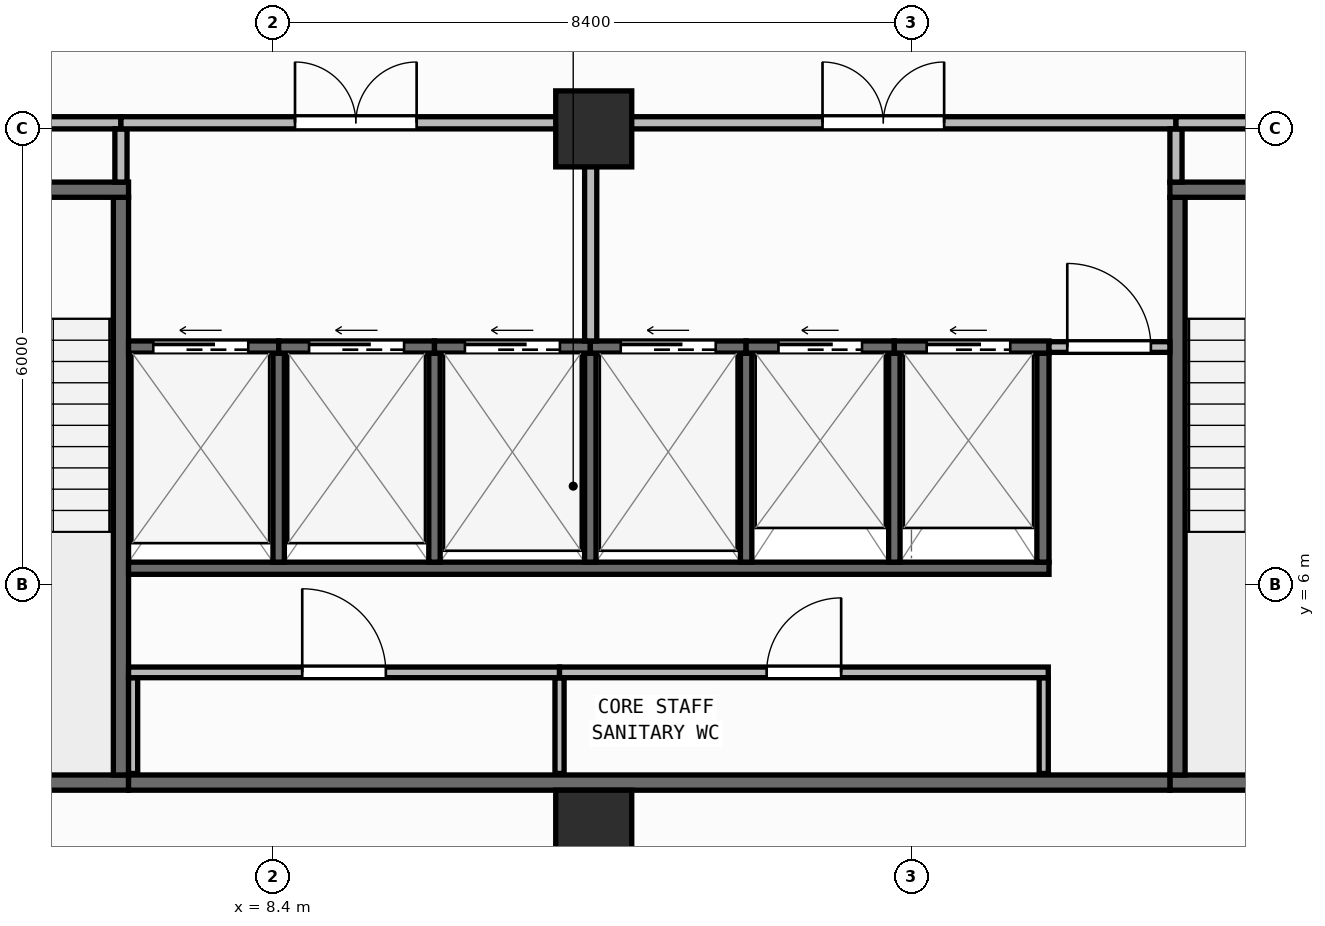
"""IFC4 building model, lengths in metres.
Left out: names, types, materials, properties, quantities, classifications, styles, units other than length and angle.
Written with IfcOpenShell. Run it as: python <this file> out.ifc"""

import sys

from ifc_helpers import new_model, si_unit, direction, frame, frame_2d, origin, origin_2d, place, context, subcontext, project, spatial, rectangle, extrude, element, fill, save


model = new_model("IFC4")
c1 = context("Model", 3, precision=1e-05, world=origin(), true_north=direction((0.0, 1.0)))
c2 = subcontext(c1, "Body", "Model", "MODEL_VIEW")
j1 = project(units=[si_unit("LENGTHUNIT", "METRE"), si_unit("PLANEANGLEUNIT", "RADIAN")], contexts=[c1])
p1 = place(None, origin())
s1 = spatial("IfcSite", under=j1, at=p1, CompositionType="ELEMENT")
p2 = place(p1, origin())
s2 = spatial("IfcBuilding", under=s1, at=p2, CompositionType="ELEMENT")
p3 = place(p2, frame((0.0, 0.0, 211.85)))
s3 = spatial("IfcBuildingStorey", under=s2, at=p3, CompositionType="ELEMENT", Elevation=211.85)
for number, where, z_axis, x_axis in (
    (1, (12.62, 2.8, 0.0), (0.0, 0.0, 1.0), (1.0, 0.0, 0.0)),
    (2, (12.62, 12.0, 0.0), (0.0, 0.0, 1.0), (1.0, 0.0, 0.0)),
):
    element("IfcColumn", number, at=place(p3, frame(where, z_axis=z_axis, x_axis=x_axis)), inside=s3, PredefinedType="COLUMN", context=c2, shape_type="SweptSolid", body=[
        extrude(rectangle(XDim=1.0, YDim=1.0, at=origin_2d()), origin(), (0.0, 0.0, 1.0), 3.95),
    ])
p4 = place(p3, frame((2.66, 0.174, 0.0), z_axis=(0.0, 0.0, 1.0), x_axis=(0.996634028439, 0.081979347142, 0.0)))
e3 = element("IfcWall", 3, at=p4, inside=s3, PredefinedType="STANDARD", context=c2, shape_type="SweptSolid", body=[
    extrude(rectangle(XDim=46.035, YDim=0.26, at=frame_2d((23.018, 0.0))), origin(), (0.0, 0.0, 1.0), 3.71),
])
p5 = place(p4, frame((21.817, 0.0, 0.9)))
e4 = element("IfcOpeningElement", 4, at=p5, cuts=e3, PredefinedType="OPENING", context=c2, shape_type="SweptSolid", body=[
    extrude(rectangle(XDim=2.4, YDim=1.65, at=frame_2d((1.2, 0.825))), frame((0.0, 0.14, 0.0), z_axis=(0.0, -1.0, 0.0), x_axis=(1.0, 0.0, 0.0)), (0.0, 0.0, 1.0), 0.28),
])
p6 = place(p3, frame((2.8, 3.4, 0.0), z_axis=(0.0, 0.0, 1.0), x_axis=(1.0, 0.0, 0.0)))
e5 = element("IfcWall", 5, at=p6, inside=s3, PredefinedType="SHEAR", context=c2, shape_type="SweptSolid", body=[
    extrude(rectangle(XDim=3.7, YDim=0.2, at=frame_2d((1.85, 0.0))), origin(), (0.0, 0.0, 1.0), 3.71),
])
p7 = place(p3, frame((6.4, 3.5, 0.0), z_axis=(0.0, 0.0, 1.0), x_axis=(0.0, 1.0, 0.0)))
e6 = element("IfcWall", 6, at=p7, inside=s3, PredefinedType="SHEAR", context=c2, shape_type="SweptSolid", body=[
    extrude(rectangle(XDim=7.6, YDim=0.2, at=frame_2d((3.8, 0.0))), origin(), (0.0, 0.0, 1.0), 3.71),
])
p8 = place(p3, frame((2.8, 11.2, 0.0), z_axis=(0.0, 0.0, 1.0), x_axis=(1.0, 0.0, 0.0)))
e7 = element("IfcWall", 7, at=p8, inside=s3, PredefinedType="SHEAR", context=c2, shape_type="SweptSolid", body=[
    extrude(rectangle(XDim=3.7, YDim=0.2, at=frame_2d((1.85, 0.0))), origin(), (0.0, 0.0, 1.0), 3.71),
])
p9 = place(p8, frame((1.2, 0.0, 0.0)))
e8 = element("IfcOpeningElement", 8, at=p9, cuts=e7, PredefinedType="OPENING", context=c2, shape_type="SweptSolid", body=[
    extrude(rectangle(XDim=1.3, YDim=2.15, at=frame_2d((0.65, 1.075))), frame((0.0, 0.11, 0.0), z_axis=(0.0, -1.0, 0.0), x_axis=(1.0, 0.0, 0.0)), (0.0, 0.0, 1.0), 0.22),
])
p10 = place(p3, frame((20.2, 3.4, 0.0), z_axis=(0.0, 0.0, 1.0), x_axis=(1.0, 0.0, 0.0)))
e9 = element("IfcWall", 9, at=p10, inside=s3, PredefinedType="SHEAR", context=c2, shape_type="SweptSolid", body=[
    extrude(rectangle(XDim=3.7, YDim=0.2, at=frame_2d((1.85, 0.0))), origin(), (0.0, 0.0, 1.0), 3.71),
])
p11 = place(p3, frame((20.3, 3.5, 0.0), z_axis=(0.0, 0.0, 1.0), x_axis=(0.0, 1.0, 0.0)))
e10 = element("IfcWall", 10, at=p11, inside=s3, PredefinedType="SHEAR", context=c2, shape_type="SweptSolid", body=[
    extrude(rectangle(XDim=7.6, YDim=0.2, at=frame_2d((3.8, 0.0))), origin(), (0.0, 0.0, 1.0), 3.71),
])
p12 = place(p3, frame((20.2, 11.2, 0.0), z_axis=(0.0, 0.0, 1.0), x_axis=(1.0, 0.0, 0.0)))
e11 = element("IfcWall", 11, at=p12, inside=s3, PredefinedType="SHEAR", context=c2, shape_type="SweptSolid", body=[
    extrude(rectangle(XDim=3.7, YDim=0.2, at=frame_2d((1.85, 0.0))), origin(), (0.0, 0.0, 1.0), 3.71),
])
p13 = place(p12, frame((1.2, 0.0, 0.0)))
e12 = element("IfcOpeningElement", 12, at=p13, cuts=e11, PredefinedType="OPENING", context=c2, shape_type="SweptSolid", body=[
    extrude(rectangle(XDim=1.3, YDim=2.15, at=frame_2d((0.65, 1.075))), frame((0.0, 0.11, 0.0), z_axis=(0.0, -1.0, 0.0), x_axis=(1.0, 0.0, 0.0)), (0.0, 0.0, 1.0), 0.22),
])
p14 = place(p3, frame((6.5, 3.4, 0.0), z_axis=(0.0, 0.0, 1.0), x_axis=(1.0, 0.0, 0.0)))
e13 = element("IfcWall", 13, at=p14, inside=s3, PredefinedType="SHEAR", context=c2, shape_type="SweptSolid", body=[
    extrude(rectangle(XDim=13.7, YDim=0.2, at=frame_2d((6.85, 0.0))), origin(), (0.0, 0.0, 1.0), 3.71),
])
p15 = place(p3, frame((6.5, 6.22, 0.0), z_axis=(0.0, 0.0, 1.0), x_axis=(1.0, 0.0, 0.0)))
e14 = element("IfcWall", 14, at=p15, inside=s3, PredefinedType="SHEAR", context=c2, shape_type="SweptSolid", body=[
    extrude(rectangle(XDim=12.11, YDim=0.16, at=frame_2d((6.055, 0.0))), origin(), (0.0, 0.0, 1.0), 3.71),
])
p16 = place(p3, frame((18.53, 6.3, 0.0), z_axis=(0.0, 0.0, 1.0), x_axis=(0.0, 1.0, 0.0)))
e15 = element("IfcWall", 15, at=p16, inside=s3, PredefinedType="SHEAR", context=c2, shape_type="SweptSolid", body=[
    extrude(rectangle(XDim=2.75, YDim=0.16, at=frame_2d((1.375, 0.0))), origin(), (0.0, 0.0, 1.0), 3.71),
])
for number, where, z_axis, x_axis in (
    (16, (8.475, 6.3, 0.0), (0.0, 0.0, 1.0), (0.0, 1.0, 0.0)),
    (17, (10.525, 6.3, 0.0), (0.0, 0.0, 1.0), (0.0, 1.0, 0.0)),
    (18, (12.575, 6.3, 0.0), (0.0, 0.0, 1.0), (0.0, 1.0, 0.0)),
    (19, (14.625, 6.3, 0.0), (0.0, 0.0, 1.0), (0.0, 1.0, 0.0)),
    (20, (16.575, 6.3, 0.0), (0.0, 0.0, 1.0), (0.0, 1.0, 0.0)),
):
    element("IfcWall", number, at=place(p3, frame(where, z_axis=z_axis, x_axis=x_axis)), inside=s3, PredefinedType="SHEAR", context=c2, shape_type="SweptSolid", body=[
        extrude(rectangle(XDim=2.75, YDim=0.15, at=frame_2d((1.375, 0.0))), origin(), (0.0, 0.0, 1.0), 3.71),
    ])
p17 = place(p3, frame((6.5, 9.13, 0.0), z_axis=(0.0, 0.0, 1.0), x_axis=(1.0, 0.0, 0.0)))
e21 = element("IfcWall", 21, at=p17, inside=s3, PredefinedType="SHEAR", context=c2, shape_type="SweptSolid", body=[
    extrude(rectangle(XDim=1.975, YDim=0.16, at=frame_2d((0.988, 0.0))), origin(), (0.0, 0.0, 1.0), 3.71),
])
p18 = place(p17, frame((0.325, 0.0, 0.0)))
e22 = element("IfcOpeningElement", 22, at=p18, cuts=e21, PredefinedType="OPENING", context=c2, shape_type="SweptSolid", body=[
    extrude(rectangle(XDim=1.25, YDim=2.15, at=frame_2d((0.625, 1.075))), frame((0.0, 0.09, 0.0), z_axis=(0.0, -1.0, 0.0), x_axis=(1.0, 0.0, 0.0)), (0.0, 0.0, 1.0), 0.18),
])
p19 = place(p3, frame((8.475, 9.13, 0.0), z_axis=(0.0, 0.0, 1.0), x_axis=(1.0, 0.0, 0.0)))
e23 = element("IfcWall", 23, at=p19, inside=s3, PredefinedType="SHEAR", context=c2, shape_type="SweptSolid", body=[
    extrude(rectangle(XDim=2.05, YDim=0.16, at=frame_2d((1.025, 0.0))), origin(), (0.0, 0.0, 1.0), 3.71),
])
p20 = place(p19, frame((0.4, 0.0, 0.0)))
e24 = element("IfcOpeningElement", 24, at=p20, cuts=e23, PredefinedType="OPENING", context=c2, shape_type="SweptSolid", body=[
    extrude(rectangle(XDim=1.25, YDim=2.15, at=frame_2d((0.625, 1.075))), frame((0.0, 0.09, 0.0), z_axis=(0.0, -1.0, 0.0), x_axis=(1.0, 0.0, 0.0)), (0.0, 0.0, 1.0), 0.18),
])
p21 = place(p3, frame((10.525, 9.13, 0.0), z_axis=(0.0, 0.0, 1.0), x_axis=(1.0, 0.0, 0.0)))
e25 = element("IfcWall", 25, at=p21, inside=s3, PredefinedType="SHEAR", context=c2, shape_type="SweptSolid", body=[
    extrude(rectangle(XDim=2.05, YDim=0.16, at=frame_2d((1.025, 0.0))), origin(), (0.0, 0.0, 1.0), 3.71),
])
p22 = place(p21, frame((0.4, 0.0, 0.0)))
e26 = element("IfcOpeningElement", 26, at=p22, cuts=e25, PredefinedType="OPENING", context=c2, shape_type="SweptSolid", body=[
    extrude(rectangle(XDim=1.25, YDim=2.15, at=frame_2d((0.625, 1.075))), frame((0.0, 0.09, 0.0), z_axis=(0.0, -1.0, 0.0), x_axis=(1.0, 0.0, 0.0)), (0.0, 0.0, 1.0), 0.18),
])
p23 = place(p3, frame((12.575, 9.13, 0.0), z_axis=(0.0, 0.0, 1.0), x_axis=(1.0, 0.0, 0.0)))
e27 = element("IfcWall", 27, at=p23, inside=s3, PredefinedType="SHEAR", context=c2, shape_type="SweptSolid", body=[
    extrude(rectangle(XDim=2.05, YDim=0.16, at=frame_2d((1.025, 0.0))), origin(), (0.0, 0.0, 1.0), 3.71),
])
p24 = place(p23, frame((0.4, 0.0, 0.0)))
e28 = element("IfcOpeningElement", 28, at=p24, cuts=e27, PredefinedType="OPENING", context=c2, shape_type="SweptSolid", body=[
    extrude(rectangle(XDim=1.25, YDim=2.15, at=frame_2d((0.625, 1.075))), frame((0.0, 0.09, 0.0), z_axis=(0.0, -1.0, 0.0), x_axis=(1.0, 0.0, 0.0)), (0.0, 0.0, 1.0), 0.18),
])
p25 = place(p3, frame((14.625, 9.13, 0.0), z_axis=(0.0, 0.0, 1.0), x_axis=(1.0, 0.0, 0.0)))
e29 = element("IfcWall", 29, at=p25, inside=s3, PredefinedType="SHEAR", context=c2, shape_type="SweptSolid", body=[
    extrude(rectangle(XDim=1.95, YDim=0.16, at=frame_2d((0.975, 0.0))), origin(), (0.0, 0.0, 1.0), 3.71),
])
p26 = place(p25, frame((0.425, 0.0, 0.0)))
e30 = element("IfcOpeningElement", 30, at=p26, cuts=e29, PredefinedType="OPENING", context=c2, shape_type="SweptSolid", body=[
    extrude(rectangle(XDim=1.1, YDim=2.15, at=frame_2d((0.55, 1.075))), frame((0.0, 0.09, 0.0), z_axis=(0.0, -1.0, 0.0), x_axis=(1.0, 0.0, 0.0)), (0.0, 0.0, 1.0), 0.18),
])
p27 = place(p3, frame((16.575, 9.13, 0.0), z_axis=(0.0, 0.0, 1.0), x_axis=(1.0, 0.0, 0.0)))
e31 = element("IfcWall", 31, at=p27, inside=s3, PredefinedType="SHEAR", context=c2, shape_type="SweptSolid", body=[
    extrude(rectangle(XDim=2.035, YDim=0.16, at=frame_2d((1.018, 0.0))), origin(), (0.0, 0.0, 1.0), 3.71),
])
p28 = place(p27, frame((0.425, 0.0, 0.0)))
e32 = element("IfcOpeningElement", 32, at=p28, cuts=e31, PredefinedType="OPENING", context=c2, shape_type="SweptSolid", body=[
    extrude(rectangle(XDim=1.1, YDim=2.15, at=frame_2d((0.55, 1.075))), frame((0.0, 0.09, 0.0), z_axis=(0.0, -1.0, 0.0), x_axis=(1.0, 0.0, 0.0)), (0.0, 0.0, 1.0), 0.18),
])
for number, where, z_axis, x_axis in (
    (33, (6.56, 3.52, 0.0), (0.0, 0.0, 1.0), (0.0, 1.0, 0.0)),
    (34, (12.17, 3.52, 0.0), (0.0, 0.0, 1.0), (0.0, 1.0, 0.0)),
    (35, (18.54, 3.52, 0.0), (0.0, 0.0, 1.0), (0.0, 1.0, 0.0)),
):
    element("IfcWall", number, at=place(p3, frame(where, z_axis=z_axis, x_axis=x_axis)), inside=s3, PredefinedType="PARTITIONING", context=c2, shape_type="SweptSolid", body=[
        extrude(rectangle(XDim=1.26, YDim=0.12, at=frame_2d((0.63, 0.0))), origin(), (0.0, 0.0, 1.0), 3.71),
    ])
p29 = place(p3, frame((6.5, 4.85, 0.0), z_axis=(0.0, 0.0, 1.0), x_axis=(1.0, 0.0, 0.0)))
e36 = element("IfcWall", 36, at=p29, inside=s3, PredefinedType="PARTITIONING", context=c2, shape_type="SweptSolid", body=[
    extrude(rectangle(XDim=5.67, YDim=0.14, at=frame_2d((2.835, 0.0))), origin(), (0.0, 0.0, 1.0), 3.71),
])
p30 = place(p29, frame((2.285, 0.0, 0.0)))
e37 = element("IfcOpeningElement", 37, at=p30, cuts=e36, PredefinedType="OPENING", context=c2, shape_type="SweptSolid", body=[
    extrude(rectangle(XDim=1.1, YDim=2.1, at=frame_2d((0.55, 1.05))), frame((0.0, 0.08, 0.0), z_axis=(0.0, -1.0, 0.0), x_axis=(1.0, 0.0, 0.0)), (0.0, 0.0, 1.0), 0.16),
])
p31 = place(p3, frame((12.17, 4.85, 0.0), z_axis=(0.0, 0.0, 1.0), x_axis=(1.0, 0.0, 0.0)))
e38 = element("IfcWall", 38, at=p31, inside=s3, PredefinedType="PARTITIONING", context=c2, shape_type="SweptSolid", body=[
    extrude(rectangle(XDim=6.43, YDim=0.14, at=frame_2d((3.215, 0.0))), origin(), (0.0, 0.0, 1.0), 3.71),
])
p32 = place(p31, frame((2.725, 0.0, 0.0)))
e39 = element("IfcOpeningElement", 39, at=p32, cuts=e38, PredefinedType="OPENING", context=c2, shape_type="SweptSolid", body=[
    extrude(rectangle(XDim=0.98, YDim=2.1, at=frame_2d((0.49, 1.05))), frame((0.0, 0.08, 0.0), z_axis=(0.0, -1.0, 0.0), x_axis=(1.0, 0.0, 0.0)), (0.0, 0.0, 1.0), 0.16),
])
p33 = place(p3, frame((18.61, 9.13, 0.0), z_axis=(0.0, 0.0, 1.0), x_axis=(1.0, 0.0, 0.0)))
e40 = element("IfcWall", 40, at=p33, inside=s3, PredefinedType="PARTITIONING", context=c2, shape_type="SweptSolid", body=[
    extrude(rectangle(XDim=1.59, YDim=0.14, at=frame_2d((0.795, 0.0))), origin(), (0.0, 0.0, 1.0), 3.71),
])
p34 = place(p33, frame((0.24, 0.0, 0.0)))
e41 = element("IfcOpeningElement", 41, at=p34, cuts=e40, PredefinedType="OPENING", context=c2, shape_type="SweptSolid", body=[
    extrude(rectangle(XDim=1.1, YDim=2.1, at=frame_2d((0.55, 1.05))), frame((0.0, 0.08, 0.0), z_axis=(0.0, -1.0, 0.0), x_axis=(1.0, 0.0, 0.0)), (0.0, 0.0, 1.0), 0.16),
])
p35 = place(p3, frame((2.8, 12.08, 0.0), z_axis=(0.0, 0.0, 1.0), x_axis=(1.0, 0.0, 0.0)))
e42 = element("IfcWall", 42, at=p35, inside=s3, PredefinedType="PARTITIONING", context=c2, shape_type="SweptSolid", body=[
    extrude(rectangle(XDim=3.6, YDim=0.16, at=frame_2d((1.8, 0.0))), origin(), (0.0, 0.0, 1.0), 3.152),
])
p36 = place(p35, frame((1.0, 0.0, 0.0)))
e43 = element("IfcOpeningElement", 43, at=p36, cuts=e42, PredefinedType="OPENING", context=c2, shape_type="SweptSolid", body=[
    extrude(rectangle(XDim=1.6, YDim=2.05, at=frame_2d((0.8, 1.025))), frame((0.0, 0.09, 0.0), z_axis=(0.0, -1.0, 0.0), x_axis=(1.0, 0.0, 0.0)), (0.0, 0.0, 1.0), 0.18),
])
p37 = place(p3, frame((6.4, 11.3, 0.0), z_axis=(0.0, 0.0, 1.0), x_axis=(0.0, 1.0, 0.0)))
e44 = element("IfcWall", 44, at=p37, inside=s3, PredefinedType="PARTITIONING", context=c2, shape_type="SweptSolid", body=[
    extrude(rectangle(XDim=0.7, YDim=0.16, at=frame_2d((0.35, 0.0))), origin(), (0.0, 0.0, 1.0), 3.71),
])
p38 = place(p3, frame((6.4, 12.08, 0.0), z_axis=(0.0, 0.0, 1.0), x_axis=(1.0, 0.0, 0.0)))
e45 = element("IfcWall", 45, at=p38, inside=s3, PredefinedType="PARTITIONING", context=c2, shape_type="SweptSolid", body=[
    extrude(rectangle(XDim=6.18, YDim=0.16, at=frame_2d((3.09, 0.0))), origin(), (0.0, 0.0, 1.0), 3.152),
])
p39 = place(p38, frame((2.29, 0.0, 0.0)))
e46 = element("IfcOpeningElement", 46, at=p39, cuts=e45, PredefinedType="OPENING", context=c2, shape_type="SweptSolid", body=[
    extrude(rectangle(XDim=1.6, YDim=2.05, at=frame_2d((0.8, 1.025))), frame((0.0, 0.09, 0.0), z_axis=(0.0, -1.0, 0.0), x_axis=(1.0, 0.0, 0.0)), (0.0, 0.0, 1.0), 0.18),
])
p40 = place(p3, frame((12.58, 9.21, 0.0), z_axis=(0.0, 0.0, 1.0), x_axis=(0.0, 1.0, 0.0)))
e47 = element("IfcWall", 47, at=p40, inside=s3, PredefinedType="PARTITIONING", context=c2, shape_type="SweptSolid", body=[
    extrude(rectangle(XDim=2.79, YDim=0.16, at=frame_2d((1.395, 0.0))), origin(), (0.0, 0.0, 1.0), 3.71),
])
p41 = place(p3, frame((12.58, 12.08, 0.0), z_axis=(0.0, 0.0, 1.0), x_axis=(1.0, 0.0, 0.0)))
e48 = element("IfcWall", 48, at=p41, inside=s3, PredefinedType="PARTITIONING", context=c2, shape_type="SweptSolid", body=[
    extrude(rectangle(XDim=7.7, YDim=0.16, at=frame_2d((3.85, 0.0))), origin(), (0.0, 0.0, 1.0), 3.152),
])
p42 = place(p41, frame((3.05, 0.0, 0.0)))
e49 = element("IfcOpeningElement", 49, at=p42, cuts=e48, PredefinedType="OPENING", context=c2, shape_type="SweptSolid", body=[
    extrude(rectangle(XDim=1.6, YDim=2.05, at=frame_2d((0.8, 1.025))), frame((0.0, 0.09, 0.0), z_axis=(0.0, -1.0, 0.0), x_axis=(1.0, 0.0, 0.0)), (0.0, 0.0, 1.0), 0.18),
])
p43 = place(p3, frame((20.28, 11.3, 0.0), z_axis=(0.0, 0.0, 1.0), x_axis=(0.0, 1.0, 0.0)))
e50 = element("IfcWall", 50, at=p43, inside=s3, PredefinedType="PARTITIONING", context=c2, shape_type="SweptSolid", body=[
    extrude(rectangle(XDim=0.7, YDim=0.16, at=frame_2d((0.35, 0.0))), origin(), (0.0, 0.0, 1.0), 3.71),
])
p44 = place(p3, frame((20.28, 12.08, 0.0), z_axis=(0.0, 0.0, 1.0), x_axis=(1.0, 0.0, 0.0)))
e51 = element("IfcWall", 51, at=p44, inside=s3, PredefinedType="PARTITIONING", context=c2, shape_type="SweptSolid", body=[
    extrude(rectangle(XDim=3.62, YDim=0.16, at=frame_2d((1.81, 0.0))), origin(), (0.0, 0.0, 1.0), 3.152),
])
p45 = place(p44, frame((1.01, 0.0, 0.0)))
e52 = element("IfcOpeningElement", 52, at=p45, cuts=e51, PredefinedType="OPENING", context=c2, shape_type="SweptSolid", body=[
    extrude(rectangle(XDim=1.6, YDim=2.05, at=frame_2d((0.8, 1.025))), frame((0.0, 0.09, 0.0), z_axis=(0.0, -1.0, 0.0), x_axis=(1.0, 0.0, 0.0)), (0.0, 0.0, 1.0), 0.18),
])
p46 = place(p18, origin())
e53 = element("IfcDoor", 53, at=p46, inside=s3, OperationType="SLIDING_TO_LEFT", PredefinedType="DOOR", context=c2, shape_type="SweptSolid", body=[
    extrude(rectangle(XDim=1.25, YDim=2.15, at=frame_2d((0.625, 1.075))), frame((0.0, 0.025, 0.0), z_axis=(0.0, -1.0, 0.0), x_axis=(1.0, 0.0, 0.0)), (0.0, 0.0, 1.0), 0.05),
])
fill(e22, e53)
p47 = place(p20, origin())
e54 = element("IfcDoor", 54, at=p47, inside=s3, OperationType="SLIDING_TO_LEFT", PredefinedType="DOOR", context=c2, shape_type="SweptSolid", body=[
    extrude(rectangle(XDim=1.25, YDim=2.15, at=frame_2d((0.625, 1.075))), frame((0.0, 0.025, 0.0), z_axis=(0.0, -1.0, 0.0), x_axis=(1.0, 0.0, 0.0)), (0.0, 0.0, 1.0), 0.05),
])
fill(e24, e54)
p48 = place(p22, origin())
e55 = element("IfcDoor", 55, at=p48, inside=s3, OperationType="SLIDING_TO_LEFT", PredefinedType="DOOR", context=c2, shape_type="SweptSolid", body=[
    extrude(rectangle(XDim=1.25, YDim=2.15, at=frame_2d((0.625, 1.075))), frame((0.0, 0.025, 0.0), z_axis=(0.0, -1.0, 0.0), x_axis=(1.0, 0.0, 0.0)), (0.0, 0.0, 1.0), 0.05),
])
fill(e26, e55)
p49 = place(p24, origin())
e56 = element("IfcDoor", 56, at=p49, inside=s3, OperationType="SLIDING_TO_LEFT", PredefinedType="DOOR", context=c2, shape_type="SweptSolid", body=[
    extrude(rectangle(XDim=1.25, YDim=2.15, at=frame_2d((0.625, 1.075))), frame((0.0, 0.025, 0.0), z_axis=(0.0, -1.0, 0.0), x_axis=(1.0, 0.0, 0.0)), (0.0, 0.0, 1.0), 0.05),
])
fill(e28, e56)
p50 = place(p26, origin())
e57 = element("IfcDoor", 57, at=p50, inside=s3, OperationType="SLIDING_TO_LEFT", PredefinedType="DOOR", context=c2, shape_type="SweptSolid", body=[
    extrude(rectangle(XDim=1.1, YDim=2.15, at=frame_2d((0.55, 1.075))), frame((0.0, 0.025, 0.0), z_axis=(0.0, -1.0, 0.0), x_axis=(1.0, 0.0, 0.0)), (0.0, 0.0, 1.0), 0.05),
])
fill(e30, e57)
p51 = place(p28, origin())
e58 = element("IfcDoor", 58, at=p51, inside=s3, OperationType="SLIDING_TO_LEFT", PredefinedType="DOOR", context=c2, shape_type="SweptSolid", body=[
    extrude(rectangle(XDim=1.1, YDim=2.15, at=frame_2d((0.55, 1.075))), frame((0.0, 0.025, 0.0), z_axis=(0.0, -1.0, 0.0), x_axis=(1.0, 0.0, 0.0)), (0.0, 0.0, 1.0), 0.05),
])
fill(e32, e58)
p52 = place(p30, origin())
e59 = element("IfcDoor", 59, at=p52, inside=s3, OperationType="SINGLE_SWING_LEFT", PredefinedType="DOOR", context=c2, shape_type="SweptSolid", body=[
    extrude(rectangle(XDim=1.1, YDim=2.1, at=frame_2d((0.55, 1.05))), frame((0.0, 0.025, 0.0), z_axis=(0.0, -1.0, 0.0), x_axis=(1.0, 0.0, 0.0)), (0.0, 0.0, 1.0), 0.05),
])
fill(e37, e59)
p53 = place(p32, origin())
e60 = element("IfcDoor", 60, at=p53, inside=s3, OperationType="SINGLE_SWING_RIGHT", PredefinedType="DOOR", context=c2, shape_type="SweptSolid", body=[
    extrude(rectangle(XDim=0.98, YDim=2.1, at=frame_2d((0.49, 1.05))), frame((0.0, 0.025, 0.0), z_axis=(0.0, -1.0, 0.0), x_axis=(1.0, 0.0, 0.0)), (0.0, 0.0, 1.0), 0.05),
])
fill(e39, e60)
p54 = place(p34, origin())
e61 = element("IfcDoor", 61, at=p54, inside=s3, OperationType="SINGLE_SWING_LEFT", PredefinedType="DOOR", context=c2, shape_type="SweptSolid", body=[
    extrude(rectangle(XDim=1.1, YDim=2.1, at=frame_2d((0.55, 1.05))), frame((0.0, 0.025, 0.0), z_axis=(0.0, -1.0, 0.0), x_axis=(1.0, 0.0, 0.0)), (0.0, 0.0, 1.0), 0.05),
])
fill(e41, e61)
p55 = place(p39, origin())
e62 = element("IfcDoor", 62, at=p55, inside=s3, OperationType="DOUBLE_DOOR_SINGLE_SWING", PredefinedType="DOOR", context=c2, shape_type="SweptSolid", body=[
    extrude(rectangle(XDim=1.6, YDim=2.05, at=frame_2d((0.8, 1.025))), frame((0.0, 0.025, 0.0), z_axis=(0.0, -1.0, 0.0), x_axis=(1.0, 0.0, 0.0)), (0.0, 0.0, 1.0), 0.05),
])
fill(e46, e62)
p56 = place(p42, origin())
e63 = element("IfcDoor", 63, at=p56, inside=s3, OperationType="DOUBLE_DOOR_SINGLE_SWING", PredefinedType="DOOR", context=c2, shape_type="SweptSolid", body=[
    extrude(rectangle(XDim=1.6, YDim=2.05, at=frame_2d((0.8, 1.025))), frame((0.0, 0.025, 0.0), z_axis=(0.0, -1.0, 0.0), x_axis=(1.0, 0.0, 0.0)), (0.0, 0.0, 1.0), 0.05),
])
fill(e49, e63)
save(model, sys.argv[1])
